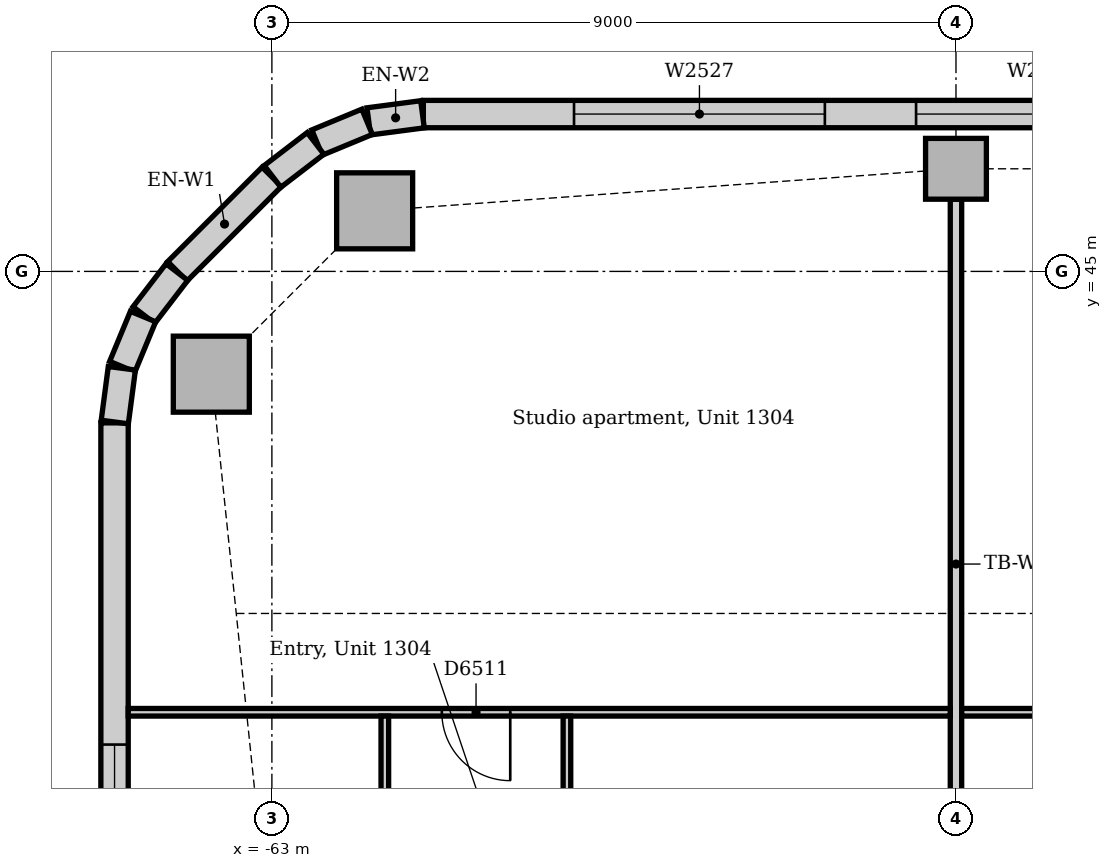
"""IFC4 building model, lengths in metres.
Left out: names, types, materials, properties, quantities, classifications, styles, units other than length and angle.
Written with IfcOpenShell. Run it as: python <this file> out.ifc"""

import sys

from ifc_helpers import new_model, si_unit, direction, frame, frame_2d, origin, origin_2d, place, context, subcontext, project, spatial, rectangle, extrude, element, fill, save


model = new_model("IFC4")
c1 = context("Model", 3, precision=1e-05, world=origin(), true_north=direction((0.0, 1.0)))
c2 = subcontext(c1, "Body", "Model", "MODEL_VIEW")
j1 = project(units=[si_unit("LENGTHUNIT", "METRE"), si_unit("PLANEANGLEUNIT", "RADIAN")], contexts=[c1])
p1 = place(None, origin())
s1 = spatial("IfcSite", under=j1, at=p1, CompositionType="ELEMENT")
p2 = place(p1, origin())
s2 = spatial("IfcBuilding", under=s1, at=p2, CompositionType="ELEMENT")
p3 = place(p2, frame((0.0, 0.0, 59.0)))
s3 = spatial("IfcBuildingStorey", under=s2, at=p3, CompositionType="ELEMENT", Elevation=59.0)
for number, where, z_axis, x_axis in (
    (1, (-61.648, 45.797, 0.0), (0.0, 0.0, 1.0), (1.0, 0.0, 0.0)),
    (2, (-63.797, 43.648, 0.0), (0.0, 0.0, 1.0), (1.0, 0.0, 0.0)),
):
    element("IfcColumn", number, at=place(p3, frame(where, z_axis=z_axis, x_axis=x_axis)), inside=s3, PredefinedType="COLUMN", context=c2, shape_type="SweptSolid", body=[
        extrude(rectangle(XDim=1.0, YDim=1.0, at=origin_2d()), origin(), (0.0, 0.0, 1.0), 3.85),
    ])
p4 = place(p3, frame((-54.0, 46.35, 0.0), z_axis=(0.0, 0.0, 1.0), x_axis=(1.0, 0.0, 0.0)))
e3 = element("IfcColumn", 3, at=p4, inside=s3, PredefinedType="COLUMN", context=c2, shape_type="SweptSolid", body=[
    extrude(rectangle(XDim=0.8, YDim=0.8, at=origin_2d()), origin(), (0.0, 0.0, 1.0), 3.85),
])
p5 = place(p3, frame((-31.243, 47.07, 0.0), z_axis=(0.0, 0.0, 1.0), x_axis=(-1.0, 0.0, 0.0)))
e4 = element("IfcWall", 4, at=p5, inside=s3, PredefinedType="STANDARD", context=c2, shape_type="SweptSolid", body=[
    extrude(rectangle(XDim=29.765, YDim=0.36, at=frame_2d((14.882, 0.0))), origin(), (0.0, 0.0, 1.0), 3.85),
])
p6 = place(p5, frame((1.982, 0.0, 0.9)))
e5 = element("IfcOpeningElement", 5, at=p6, cuts=e4, PredefinedType="OPENING", context=c2, shape_type="SweptSolid", body=[
    extrude(rectangle(XDim=3.3, YDim=1.6, at=frame_2d((1.65, 0.8))), frame((0.0, 0.19, 0.0), z_axis=(0.0, -1.0, 0.0), x_axis=(1.0, 0.0, 0.0)), (0.0, 0.0, 1.0), 0.38),
])
p7 = place(p5, frame((6.482, 0.0, 0.9)))
e6 = element("IfcOpeningElement", 6, at=p7, cuts=e4, PredefinedType="OPENING", context=c2, shape_type="SweptSolid", body=[
    extrude(rectangle(XDim=3.3, YDim=1.6, at=frame_2d((1.65, 0.8))), frame((0.0, 0.19, 0.0), z_axis=(0.0, -1.0, 0.0), x_axis=(1.0, 0.0, 0.0)), (0.0, 0.0, 1.0), 0.38),
])
p8 = place(p5, frame((10.982, 0.0, 0.9)))
e7 = element("IfcOpeningElement", 7, at=p8, cuts=e4, PredefinedType="OPENING", context=c2, shape_type="SweptSolid", body=[
    extrude(rectangle(XDim=3.3, YDim=1.6, at=frame_2d((1.65, 0.8))), frame((0.0, 0.19, 0.0), z_axis=(0.0, -1.0, 0.0), x_axis=(1.0, 0.0, 0.0)), (0.0, 0.0, 1.0), 0.38),
])
p9 = place(p5, frame((15.482, 0.0, 0.9)))
e8 = element("IfcOpeningElement", 8, at=p9, cuts=e4, PredefinedType="OPENING", context=c2, shape_type="SweptSolid", body=[
    extrude(rectangle(XDim=3.3, YDim=1.6, at=frame_2d((1.65, 0.8))), frame((0.0, 0.19, 0.0), z_axis=(0.0, -1.0, 0.0), x_axis=(1.0, 0.0, 0.0)), (0.0, 0.0, 1.0), 0.38),
])
p10 = place(p5, frame((19.982, 0.0, 0.9)))
e9 = element("IfcOpeningElement", 9, at=p10, cuts=e4, PredefinedType="OPENING", context=c2, shape_type="SweptSolid", body=[
    extrude(rectangle(XDim=3.3, YDim=1.6, at=frame_2d((1.65, 0.8))), frame((0.0, 0.19, 0.0), z_axis=(0.0, -1.0, 0.0), x_axis=(1.0, 0.0, 0.0)), (0.0, 0.0, 1.0), 0.38),
])
p11 = place(p5, frame((24.482, 0.0, 0.9)))
e10 = element("IfcOpeningElement", 10, at=p11, cuts=e4, PredefinedType="OPENING", context=c2, shape_type="SweptSolid", body=[
    extrude(rectangle(XDim=3.3, YDim=1.6, at=frame_2d((1.65, 0.8))), frame((0.0, 0.19, 0.0), z_axis=(0.0, -1.0, 0.0), x_axis=(1.0, 0.0, 0.0)), (0.0, 0.0, 1.0), 0.38),
])
p12 = place(p3, frame((-63.001, 46.244, 0.0), z_axis=(0.0, 0.0, 1.0), x_axis=(-0.707106781187, -0.707106781187, 0.0)))
e11 = element("IfcWall", 11, at=p12, inside=s3, PredefinedType="STANDARD", context=c2, shape_type="SweptSolid", body=[
    extrude(rectangle(XDim=1.757, YDim=0.36, at=frame_2d((0.879, 0.0))), origin(), (0.0, 0.0, 1.0), 3.85),
])
p13 = place(p3, frame((-65.07, 43.007, 0.0), z_axis=(0.0, 0.0, 1.0), x_axis=(0.0, -1.0, 0.0)))
e12 = element("IfcWall", 12, at=p13, inside=s3, PredefinedType="STANDARD", context=c2, shape_type="SweptSolid", body=[
    extrude(rectangle(XDim=23.765, YDim=0.36, at=frame_2d((11.882, 0.0))), origin(), (0.0, 0.0, 1.0), 3.85),
])
p14 = place(p13, frame((4.232, 0.0, 0.9)))
e13 = element("IfcOpeningElement", 13, at=p14, cuts=e12, PredefinedType="OPENING", context=c2, shape_type="SweptSolid", body=[
    extrude(rectangle(XDim=1.8, YDim=1.6, at=frame_2d((0.9, 0.8))), frame((0.0, 0.19, 0.0), z_axis=(0.0, -1.0, 0.0), x_axis=(1.0, 0.0, 0.0)), (0.0, 0.0, 1.0), 0.38),
])
p15 = place(p13, frame((9.332, 0.0, 0.9)))
e14 = element("IfcOpeningElement", 14, at=p15, cuts=e12, PredefinedType="OPENING", context=c2, shape_type="SweptSolid", body=[
    extrude(rectangle(XDim=1.8, YDim=1.6, at=frame_2d((0.9, 0.8))), frame((0.0, 0.19, 0.0), z_axis=(0.0, -1.0, 0.0), x_axis=(1.0, 0.0, 0.0)), (0.0, 0.0, 1.0), 0.38),
])
p16 = place(p13, frame((12.482, 0.0, 0.9)))
e15 = element("IfcOpeningElement", 15, at=p16, cuts=e12, PredefinedType="OPENING", context=c2, shape_type="SweptSolid", body=[
    extrude(rectangle(XDim=3.3, YDim=1.6, at=frame_2d((1.65, 0.8))), frame((0.0, 0.19, 0.0), z_axis=(0.0, -1.0, 0.0), x_axis=(1.0, 0.0, 0.0)), (0.0, 0.0, 1.0), 0.38),
])
p17 = place(p13, frame((16.982, 0.0, 0.9)))
e16 = element("IfcOpeningElement", 16, at=p17, cuts=e12, PredefinedType="OPENING", context=c2, shape_type="SweptSolid", body=[
    extrude(rectangle(XDim=3.3, YDim=1.6, at=frame_2d((1.65, 0.8))), frame((0.0, 0.19, 0.0), z_axis=(0.0, -1.0, 0.0), x_axis=(1.0, 0.0, 0.0)), (0.0, 0.0, 1.0), 0.38),
])
for number, where, z_axis, x_axis in (
    (17, (-61.019, 47.067, 0.0), (0.0, 0.0, 1.0), (-0.991, -0.131, 0.0)),
    (18, (-61.747, 46.968, 0.0), (0.0, 0.0, 1.0), (-0.924, -0.383, 0.0)),
):
    element("IfcWall", number, at=place(p3, frame(where, z_axis=z_axis, x_axis=x_axis)), inside=s3, PredefinedType="STANDARD", context=c2, shape_type="SweptSolid", body=[
        extrude(rectangle(XDim=0.713, YDim=0.36, at=frame_2d((0.356, 0.0))), origin(), (0.0, 0.0, 1.0), 3.85),
    ])
for number, where, z_axis, x_axis in (
    (19, (-62.425, 46.684, 0.0), (0.0, 0.0, 1.0), (-0.793, -0.609, 0.0)),
    (20, (-64.25, 44.991, 0.0), (0.0, 0.0, 1.0), (-0.609, -0.793, 0.0)),
):
    element("IfcWall", number, at=place(p3, frame(where, z_axis=z_axis, x_axis=x_axis)), inside=s3, PredefinedType="STANDARD", context=c2, shape_type="SweptSolid", body=[
        extrude(rectangle(XDim=0.713, YDim=0.36, at=frame_2d((0.357, 0.0))), origin(), (0.0, 0.0, 1.0), 3.85),
    ])
for number, where, z_axis, x_axis in (
    (21, (-64.695, 44.406, 0.0), (0.0, 0.0, 1.0), (-0.383, -0.924, 0.0)),
    (22, (-64.974, 43.726, 0.0), (0.0, 0.0, 1.0), (-0.131, -0.991, 0.0)),
):
    element("IfcWall", number, at=place(p3, frame(where, z_axis=z_axis, x_axis=x_axis)), inside=s3, PredefinedType="STANDARD", context=c2, shape_type="SweptSolid", body=[
        extrude(rectangle(XDim=0.713, YDim=0.36, at=frame_2d((0.356, 0.0))), origin(), (0.0, 0.0, 1.0), 3.85),
    ])
p18 = place(p3, frame((-54.0, 36.35, 0.0), z_axis=(0.0, 0.0, 1.0), x_axis=(0.0, 1.0, 0.0)))
e23 = element("IfcWall", 23, at=p18, inside=s3, PredefinedType="PARTITIONING", context=c2, shape_type="SweptSolid", body=[
    extrude(rectangle(XDim=9.6, YDim=0.15, at=frame_2d((4.8, 0.0))), origin(), (0.0, 0.0, 1.0), 3.256),
])
p19 = place(p3, frame((-53.925, 39.2, 0.0), z_axis=(0.0, 0.0, 1.0), x_axis=(1.0, 0.0, 0.0)))
e24 = element("IfcWall", 24, at=p19, inside=s3, PredefinedType="PARTITIONING", context=c2, shape_type="SweptSolid", body=[
    extrude(rectangle(XDim=8.975, YDim=0.1, at=frame_2d((4.487, 0.0))), origin(), (0.0, 0.0, 1.0), 3.85),
])
p20 = place(p19, frame((3.265, 0.0, 0.0)))
e25 = element("IfcOpeningElement", 25, at=p20, cuts=e24, PredefinedType="OPENING", context=c2, shape_type="SweptSolid", body=[
    extrude(rectangle(XDim=0.9, YDim=2.1, at=frame_2d((0.45, 1.05))), frame((0.0, 0.06, 0.0), z_axis=(0.0, -1.0, 0.0), x_axis=(1.0, 0.0, 0.0)), (0.0, 0.0, 1.0), 0.12),
])
p21 = place(p3, frame((-64.89, 39.2, 0.0), z_axis=(0.0, 0.0, 1.0), x_axis=(1.0, 0.0, 0.0)))
e26 = element("IfcWall", 26, at=p21, inside=s3, PredefinedType="PARTITIONING", context=c2, shape_type="SweptSolid", body=[
    extrude(rectangle(XDim=10.815, YDim=0.1, at=frame_2d((5.407, 0.0))), origin(), (0.0, 0.0, 1.0), 3.85),
])
p22 = place(p21, frame((4.126, 0.0, 0.0)))
e27 = element("IfcOpeningElement", 27, at=p22, cuts=e26, PredefinedType="OPENING", context=c2, shape_type="SweptSolid", body=[
    extrude(rectangle(XDim=0.9, YDim=2.1, at=frame_2d((0.45, 1.05))), frame((0.0, 0.06, 0.0), z_axis=(0.0, -1.0, 0.0), x_axis=(1.0, 0.0, 0.0)), (0.0, 0.0, 1.0), 0.12),
])
p23 = place(p3, frame((-61.514, 36.075, 0.0), z_axis=(0.0, 0.0, 1.0), x_axis=(0.0, 1.0, 0.0)))
e28 = element("IfcWall", 28, at=p23, inside=s3, PredefinedType="PARTITIONING", context=c2, shape_type="SweptSolid", body=[
    extrude(rectangle(XDim=3.075, YDim=0.1, at=frame_2d((1.538, 0.0))), origin(), (0.0, 0.0, 1.0), 3.85),
])
p24 = place(p23, frame((1.1, 0.0, 0.0)))
e29 = element("IfcOpeningElement", 29, at=p24, cuts=e28, PredefinedType="OPENING", context=c2, shape_type="SweptSolid", body=[
    extrude(rectangle(XDim=0.9, YDim=2.1, at=frame_2d((0.45, 1.05))), frame((0.0, 0.06, 0.0), z_axis=(0.0, -1.0, 0.0), x_axis=(1.0, 0.0, 0.0)), (0.0, 0.0, 1.0), 0.12),
])
p25 = place(p3, frame((-59.118, 36.075, 0.0), z_axis=(0.0, 0.0, 1.0), x_axis=(0.0, 1.0, 0.0)))
e30 = element("IfcWall", 30, at=p25, inside=s3, PredefinedType="PARTITIONING", context=c2, shape_type="SweptSolid", body=[
    extrude(rectangle(XDim=3.075, YDim=0.1, at=frame_2d((1.538, 0.0))), origin(), (0.0, 0.0, 1.0), 3.85),
])
p26 = place(p25, frame((1.1, 0.0, 0.0)))
e31 = element("IfcOpeningElement", 31, at=p26, cuts=e30, PredefinedType="OPENING", context=c2, shape_type="SweptSolid", body=[
    extrude(rectangle(XDim=0.9, YDim=2.1, at=frame_2d((0.45, 1.05))), frame((0.0, 0.06, 0.0), z_axis=(0.0, -1.0, 0.0), x_axis=(1.0, 0.0, 0.0)), (0.0, 0.0, 1.0), 0.12),
])
p27 = place(p10, origin())
e32 = element("IfcWindow", 32, at=p27, inside=s3, PartitioningType="SINGLE_PANEL", PredefinedType="WINDOW", context=c2, shape_type="SweptSolid", body=[
    extrude(rectangle(XDim=3.3, YDim=1.6, at=frame_2d((1.65, 0.8))), frame((0.0, 0.13, 0.0), z_axis=(0.0, -1.0, 0.0), x_axis=(1.0, 0.0, 0.0)), (0.0, 0.0, 1.0), 0.06),
])
fill(e9, e32)
p28 = place(p11, origin())
e33 = element("IfcWindow", 33, at=p28, inside=s3, PartitioningType="SINGLE_PANEL", PredefinedType="WINDOW", context=c2, shape_type="SweptSolid", body=[
    extrude(rectangle(XDim=3.3, YDim=1.6, at=frame_2d((1.65, 0.8))), frame((0.0, 0.13, 0.0), z_axis=(0.0, -1.0, 0.0), x_axis=(1.0, 0.0, 0.0)), (0.0, 0.0, 1.0), 0.06),
])
fill(e10, e33)
p29 = place(p14, origin())
e34 = element("IfcWindow", 34, at=p29, inside=s3, PartitioningType="SINGLE_PANEL", PredefinedType="WINDOW", context=c2, shape_type="SweptSolid", body=[
    extrude(rectangle(XDim=1.8, YDim=1.6, at=frame_2d((0.9, 0.8))), frame((0.0, 0.13, 0.0), z_axis=(0.0, -1.0, 0.0), x_axis=(1.0, 0.0, 0.0)), (0.0, 0.0, 1.0), 0.06),
])
fill(e13, e34)
p30 = place(p22, frame((0.9, 0.0, 0.0), z_axis=(0.0, 0.0, 1.0), x_axis=(-1.0, 0.0, 0.0)))
e35 = element("IfcDoor", 35, at=p30, inside=s3, OperationType="SINGLE_SWING_LEFT", PredefinedType="DOOR", context=c2, shape_type="SweptSolid", body=[
    extrude(rectangle(XDim=0.9, YDim=2.1, at=frame_2d((0.45, 1.05))), frame((0.0, 0.025, 0.0), z_axis=(0.0, -1.0, 0.0), x_axis=(1.0, 0.0, 0.0)), (0.0, 0.0, 1.0), 0.05),
])
fill(e27, e35)
save(model, sys.argv[1])
